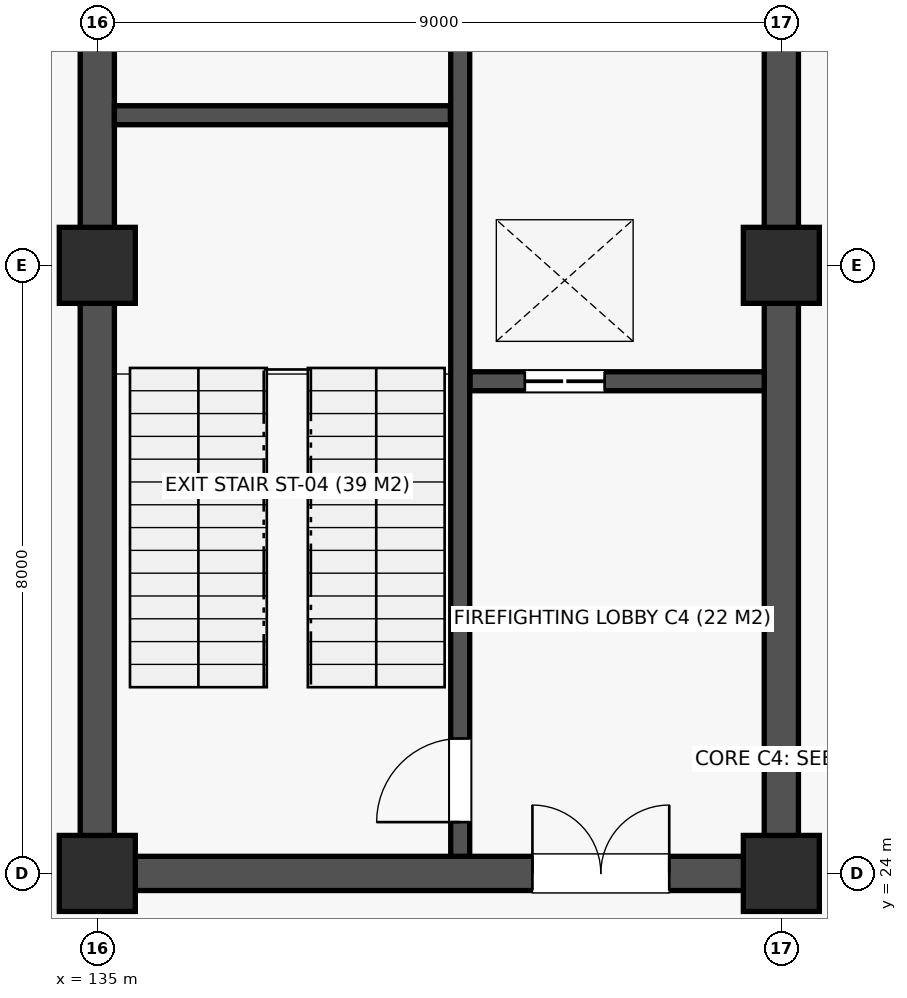
"""IFC4 building model, lengths in metres.
Left out: names, types, materials, properties, quantities, classifications, styles, units other than length and angle.
Written with IfcOpenShell. Run it as: python <this file> out.ifc"""

import sys

from ifc_helpers import new_model, si_unit, direction, frame, frame_2d, origin, origin_2d, place, context, subcontext, project, spatial, rectangle, extrude, element, fill, save


model = new_model("IFC4")
c1 = context("Model", 3, precision=1e-05, world=origin(), true_north=direction((0.0, 1.0)))
c2 = subcontext(c1, "Body", "Model", "MODEL_VIEW")
j1 = project(units=[si_unit("LENGTHUNIT", "METRE"), si_unit("PLANEANGLEUNIT", "RADIAN")], contexts=[c1])
p1 = place(None, origin())
s1 = spatial("IfcSite", under=j1, at=p1, CompositionType="ELEMENT")
p2 = place(p1, origin())
s2 = spatial("IfcBuilding", under=s1, at=p2, CompositionType="ELEMENT")
p3 = place(p2, frame((0.0, 0.0, -9.0)))
s3 = spatial("IfcBuildingStorey", under=s2, at=p3, CompositionType="ELEMENT", Elevation=-9.0)
for number, where, z_axis, x_axis in (
    (1, (135.0, 24.0, 0.0), (0.0, 0.0, 1.0), (1.0, 0.0, 0.0)),
    (2, (135.0, 32.0, 0.0), (0.0, 0.0, 1.0), (1.0, 0.0, 0.0)),
    (3, (144.0, 24.0, 0.0), (0.0, 0.0, 1.0), (1.0, 0.0, 0.0)),
    (4, (144.0, 32.0, 0.0), (0.0, 0.0, 1.0), (1.0, 0.0, 0.0)),
):
    element("IfcColumn", number, at=place(p3, frame(where, z_axis=z_axis, x_axis=x_axis)), inside=s3, PredefinedType="COLUMN", context=c2, shape_type="SweptSolid", body=[
        extrude(rectangle(XDim=1.0, YDim=1.0, at=origin_2d()), origin(), (0.0, 0.0, 1.0), 4.5),
    ])
p4 = place(p3, frame((135.225, 24.0, 0.0), z_axis=(0.0, 0.0, 1.0), x_axis=(1.0, 0.0, 0.0)))
e5 = element("IfcWall", 5, at=p4, inside=s3, PredefinedType="SHEAR", context=c2, shape_type="SweptSolid", body=[
    extrude(rectangle(XDim=8.55, YDim=0.45, at=frame_2d((4.275, 0.0))), origin(), (0.0, 0.0, 1.0), 4.2),
])
p5 = place(p4, frame((5.5, 0.0, 0.0)))
e6 = element("IfcOpeningElement", 6, at=p5, cuts=e5, PredefinedType="OPENING", context=c2, shape_type="SweptSolid", body=[
    extrude(rectangle(XDim=1.8, YDim=2.18, at=frame_2d((0.9, 1.09))), frame((0.0, 0.237, 0.0), z_axis=(0.0, -1.0, 0.0), x_axis=(1.0, 0.0, 0.0)), (0.0, 0.0, 1.0), 0.474),
])
p6 = place(p3, frame((135.0, 24.225, 0.0), z_axis=(0.0, 0.0, 1.0), x_axis=(0.0, 1.0, 0.0)))
e7 = element("IfcWall", 7, at=p6, inside=s3, PredefinedType="SHEAR", context=c2, shape_type="SweptSolid", body=[
    extrude(rectangle(XDim=15.55, YDim=0.45, at=frame_2d((7.775, 0.0))), origin(), (0.0, 0.0, 1.0), 4.2),
])
p7 = place(p6, frame((11.2, 0.0, 0.0)))
e8 = element("IfcOpeningElement", 8, at=p7, cuts=e7, PredefinedType="OPENING", context=c2, shape_type="SweptSolid", body=[
    extrude(rectangle(XDim=0.95, YDim=2.1, at=frame_2d((0.475, 1.05))), frame((0.0, 0.237, 0.0), z_axis=(0.0, -1.0, 0.0), x_axis=(1.0, 0.0, 0.0)), (0.0, 0.0, 1.0), 0.474),
])
p8 = place(p3, frame((144.0, 24.225, 0.0), z_axis=(0.0, 0.0, 1.0), x_axis=(0.0, 1.0, 0.0)))
e9 = element("IfcWall", 9, at=p8, inside=s3, PredefinedType="SHEAR", context=c2, shape_type="SweptSolid", body=[
    extrude(rectangle(XDim=15.55, YDim=0.45, at=frame_2d((7.775, 0.0))), origin(), (0.0, 0.0, 1.0), 4.2),
])
p9 = place(p3, frame((139.775, 24.225, 0.0), z_axis=(0.0, 0.0, 1.0), x_axis=(0.0, 1.0, 0.0)))
e10 = element("IfcWall", 10, at=p9, inside=s3, PredefinedType="SOLIDWALL", context=c2, shape_type="SweptSolid", body=[
    extrude(rectangle(XDim=15.55, YDim=0.25, at=frame_2d((7.775, 0.0))), origin(), (0.0, 0.0, 1.0), 4.2),
])
p10 = place(p9, frame((0.45, 0.0, 0.0)))
e11 = element("IfcOpeningElement", 11, at=p10, cuts=e10, PredefinedType="OPENING", context=c2, shape_type="SweptSolid", body=[
    extrude(rectangle(XDim=1.1, YDim=2.15, at=frame_2d((0.55, 1.075))), frame((0.0, 0.137, 0.0), z_axis=(0.0, -1.0, 0.0), x_axis=(1.0, 0.0, 0.0)), (0.0, 0.0, 1.0), 0.274),
])
p11 = place(p3, frame((135.225, 33.975, 0.0), z_axis=(0.0, 0.0, 1.0), x_axis=(1.0, 0.0, 0.0)))
e12 = element("IfcWall", 12, at=p11, inside=s3, PredefinedType="SOLIDWALL", context=c2, shape_type="SweptSolid", body=[
    extrude(rectangle(XDim=4.42, YDim=0.25, at=frame_2d((2.21, 0.0))), origin(), (0.0, 0.0, 1.0), 4.2),
])
p12 = place(p3, frame((139.905, 30.475, 0.0), z_axis=(0.0, 0.0, 1.0), x_axis=(1.0, 0.0, 0.0)))
e13 = element("IfcWall", 13, at=p12, inside=s3, PredefinedType="SOLIDWALL", context=c2, shape_type="SweptSolid", body=[
    extrude(rectangle(XDim=3.87, YDim=0.25, at=frame_2d((1.935, 0.0))), origin(), (0.0, 0.0, 1.0), 4.2),
])
p13 = place(p12, frame((0.72, 0.0, 0.0)))
e14 = element("IfcOpeningElement", 14, at=p13, cuts=e13, PredefinedType="OPENING", context=c2, shape_type="SweptSolid", body=[
    extrude(rectangle(XDim=1.05, YDim=2.12, at=frame_2d((0.525, 1.06))), frame((0.0, 0.137, 0.0), z_axis=(0.0, -1.0, 0.0), x_axis=(1.0, 0.0, 0.0)), (0.0, 0.0, 1.0), 0.274),
])
p14 = place(p5, origin())
e15 = element("IfcDoor", 15, at=p14, inside=s3, OperationType="DOUBLE_DOOR_SINGLE_SWING", PredefinedType="DOOR", context=c2, shape_type="SweptSolid", body=[
    extrude(rectangle(XDim=1.8, YDim=2.18, at=frame_2d((0.9, 1.09))), frame((0.0, 0.025, 0.0), z_axis=(0.0, -1.0, 0.0), x_axis=(1.0, 0.0, 0.0)), (0.0, 0.0, 1.0), 0.05),
])
fill(e6, e15)
p15 = place(p10, origin())
e16 = element("IfcDoor", 16, at=p15, inside=s3, OperationType="SINGLE_SWING_LEFT", PredefinedType="DOOR", context=c2, shape_type="SweptSolid", body=[
    extrude(rectangle(XDim=1.1, YDim=2.15, at=frame_2d((0.55, 1.075))), frame((0.0, 0.025, 0.0), z_axis=(0.0, -1.0, 0.0), x_axis=(1.0, 0.0, 0.0)), (0.0, 0.0, 1.0), 0.05),
])
fill(e11, e16)
p16 = place(p13, origin())
e17 = element("IfcDoor", 17, at=p16, inside=s3, OperationType="DOUBLE_DOOR_SLIDING", PredefinedType="DOOR", context=c2, shape_type="SweptSolid", body=[
    extrude(rectangle(XDim=1.05, YDim=2.12, at=frame_2d((0.525, 1.06))), frame((0.0, 0.025, 0.0), z_axis=(0.0, -1.0, 0.0), x_axis=(1.0, 0.0, 0.0)), (0.0, 0.0, 1.0), 0.05),
])
fill(e14, e17)
save(model, sys.argv[1])
